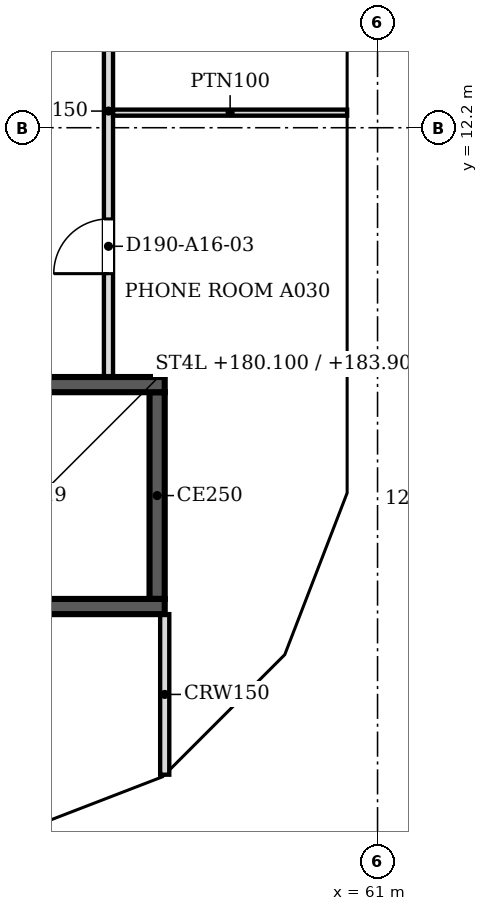
"""IFC4 building model, lengths in metres.
Left out: names, types, materials, properties, quantities, classifications, styles, units other than length and angle.
Written with IfcOpenShell. Run it as: python <this file> out.ifc"""

import sys

from ifc_helpers import new_model, si_unit, direction, frame, frame_2d, origin, place, context, subcontext, project, spatial, polyline, rectangle, outline, extrude, faceted_brep, source, transform, mapped, element, fill, save


model = new_model("IFC4")
c1 = context("Model", 3, precision=1e-05, world=origin(), true_north=direction((0.0, 1.0)))
c2 = subcontext(c1, "Body", "Model", "MODEL_VIEW")
j1 = project(units=[si_unit("LENGTHUNIT", "METRE"), si_unit("PLANEANGLEUNIT", "RADIAN")], contexts=[c1])
p1 = place(None, origin())
s1 = spatial("IfcSite", under=j1, at=p1, CompositionType="ELEMENT")
p2 = place(p1, origin())
s2 = spatial("IfcBuilding", under=s1, at=p2, CompositionType="ELEMENT")
p3 = place(p2, frame((0.0, 0.0, 178.2)))
s3 = spatial("IfcBuildingStorey", under=s2, at=p3, CompositionType="ELEMENT", Elevation=178.2)
m1 = source(origin(), c2, "Body", "Brep", [
    faceted_brep([(0.047, -0.25, 0.0), (2.997, -0.25, 3.8), (0.047, -0.25, 7.6), (0.0, -0.25, 7.541), (0.0, -0.25, 0.059), (0.093, 0.25, 7.54), (2.944, 0.25, 3.868), (2.944, 0.25, 3.732), (0.093, 0.25, 0.06), (2.997, 0.0, 3.8), (0.047, 0.0, 0.0), (0.047, 0.0, 7.6)], [[[0, 1, 2, 3, 4]], [[5, 6, 7, 8]], [[8, 7, 9, 1, 0, 10]], [[6, 5, 11, 2, 1, 9]], [[3, 2, 11]], [[10, 0, 4]], [[8, 10, 4, 3, 11, 5]], [[9, 7, 6]]]),
])
p4 = place(p3, frame((54.81, 0.233, -3.8), z_axis=(0.0, 0.0, 1.0), x_axis=(0.932990326376, 0.359901446078, 0.0)))
e1 = element("IfcWall", 1, at=p4, inside=s3, PredefinedType="SOLIDWALL", context=c2, shape_type="MappedRepresentation", body=[
    mapped(m1, transform((0.0, 0.0, 0.0), scale=1.0)),
])
m2 = source(origin(), c2, "Body", "SweptSolid", [
    extrude(outline(polyline([(0.247, 0.665), (2.681, 3.8), (0.247, 6.935), (0.247, 0.665)])), frame((0.0, 0.26, 0.0), z_axis=(0.0, -1.0, 0.0), x_axis=(1.0, 0.0, 0.0)), (0.0, 0.0, 1.0), 0.52),
])
p5 = place(p4, origin())
e2 = element("IfcOpeningElement", 2, at=p5, cuts=e1, PredefinedType="OPENING", context=c2, shape_type="MappedRepresentation", body=[
    mapped(m2, transform((0.0, 0.0, 0.0), scale=1.0)),
])
m3 = source(origin(), c2, "Body", "Brep", [
    faceted_brep([(2.944, -0.25, 0.0), (2.997, -0.25, 0.068), (2.997, -0.25, 7.532), (2.944, -0.25, 7.6), (0.0, -0.25, 3.8), (0.053, 0.25, 3.868), (2.891, 0.25, 7.532), (2.891, 0.25, 0.068), (0.053, 0.25, 3.732), (2.944, 0.0, 0.0), (2.944, 0.0, 7.6), (0.0, 0.0, 3.8)], [[[0, 1, 2, 3, 4]], [[5, 6, 7, 8]], [[1, 0, 9]], [[10, 3, 2]], [[6, 5, 11, 4, 3, 10]], [[8, 7, 9, 0, 4, 11]], [[8, 11, 5]], [[1, 9, 7, 6, 10, 2]]]),
])
p6 = place(p3, frame((57.606, 1.312, -3.8), z_axis=(0.0, 0.0, 1.0), x_axis=(0.707147509625, 0.707066050402, 0.0)))
e3 = element("IfcWall", 3, at=p6, inside=s3, PredefinedType="SOLIDWALL", context=c2, shape_type="MappedRepresentation", body=[
    mapped(m3, transform((0.0, 0.0, 0.0), scale=1.0)),
])
m4 = source(origin(), c2, "Body", "SweptSolid", [
    extrude(outline(polyline([(2.744, 6.934), (0.316, 3.8), (2.744, 0.667), (2.744, 6.934)])), frame((0.0, 0.26, 0.0), z_axis=(0.0, -1.0, 0.0), x_axis=(1.0, 0.0, 0.0)), (0.0, 0.0, 1.0), 0.52),
])
p7 = place(p6, origin())
e4 = element("IfcOpeningElement", 4, at=p7, cuts=e3, PredefinedType="OPENING", context=c2, shape_type="MappedRepresentation", body=[
    mapped(m4, transform((0.0, 0.0, 0.0), scale=1.0)),
])
m5 = source(origin(), c2, "Body", "Brep", [
    faceted_brep([(0.053, -0.25, 0.0), (3.003, -0.25, 3.8), (0.053, -0.25, 7.6), (0.0, -0.25, 7.532), (0.0, -0.25, 0.068), (0.106, 0.25, 7.532), (2.957, 0.25, 3.86), (2.957, 0.25, 3.74), (0.106, 0.25, 0.068), (3.003, 0.0, 3.8), (0.053, 0.0, 0.0), (0.053, 0.0, 7.6)], [[[0, 1, 2, 3, 4]], [[5, 6, 7, 8]], [[8, 7, 9, 1, 0, 10]], [[6, 5, 11, 2, 1, 9]], [[3, 2, 11]], [[10, 0, 4]], [[8, 10, 4, 3, 11, 5]], [[9, 7, 6]]]),
])
p8 = place(p3, frame((59.669, 3.344, -3.8), z_axis=(0.0, 0.0, 1.0), x_axis=(0.35992665181, 0.932980602862, 0.0)))
e5 = element("IfcWall", 5, at=p8, inside=s3, PredefinedType="SOLIDWALL", context=c2, shape_type="MappedRepresentation", body=[
    mapped(m5, transform((0.0, 0.0, 0.0), scale=1.0)),
])
m6 = source(origin(), c2, "Body", "SweptSolid", [
    extrude(outline(polyline([(0.253, 0.665), (2.687, 3.8), (0.253, 6.935), (0.253, 0.665)])), frame((0.0, 0.26, 0.0), z_axis=(0.0, -1.0, 0.0), x_axis=(1.0, 0.0, 0.0)), (0.0, 0.0, 1.0), 0.52),
])
p9 = place(p8, origin())
e6 = element("IfcOpeningElement", 6, at=p9, cuts=e5, PredefinedType="OPENING", context=c2, shape_type="MappedRepresentation", body=[
    mapped(m6, transform((0.0, 0.0, 0.0), scale=1.0)),
])
m7 = source(origin(), c2, "Body", "Brep", [
    faceted_brep([(3.003, -0.25, 0.0), (6.053, -0.25, 3.8), (3.003, -0.25, 7.6), (0.0, -0.25, 3.8), (0.047, 0.25, 3.859), (3.003, 0.25, 7.6), (6.053, 0.25, 3.8), (3.003, 0.25, 0.0), (0.047, 0.25, 3.741), (0.0, 0.0, 3.8)], [[[0, 1, 2, 3]], [[4, 5, 6, 7, 8]], [[7, 6, 1, 0]], [[6, 5, 2, 1]], [[5, 4, 9, 3, 2]], [[8, 7, 0, 3, 9]], [[8, 9, 4]]]),
])
p10 = place(p3, frame((60.75, 6.146, -3.8), z_axis=(0.0, 0.0, 1.0), x_axis=(0.0, 1.0, 0.0)))
e7 = element("IfcWall", 7, at=p10, inside=s3, PredefinedType="SOLIDWALL", context=c2, shape_type="MappedRepresentation", body=[
    mapped(m7, transform((0.0, 0.0, 0.0), scale=1.0)),
])
m8 = source(origin(), c2, "Body", "SweptSolid", [
    extrude(outline(polyline([(3.005, 0.401), (5.733, 3.8), (3.005, 7.199), (0.319, 3.8), (3.005, 0.401)])), frame((0.0, 0.26, 0.0), z_axis=(0.0, -1.0, 0.0), x_axis=(1.0, 0.0, 0.0)), (0.0, 0.0, 1.0), 0.52),
])
p11 = place(p10, origin())
e8 = element("IfcOpeningElement", 8, at=p11, cuts=e7, PredefinedType="OPENING", context=c2, shape_type="MappedRepresentation", body=[
    mapped(m8, transform((0.0, 0.0, 0.0), scale=1.0)),
])
m9 = source(origin(), c2, "Body", "SweptSolid", [
    extrude(outline(polyline([(3.05, 0.0), (6.1, 3.8), (3.05, 7.6), (0.0, 3.8), (3.05, 0.0)])), frame((0.0, 0.25, 0.0), z_axis=(0.0, -1.0, 0.0), x_axis=(1.0, 0.0, 0.0)), (0.0, 0.0, 1.0), 0.5),
])
p12 = place(p3, frame((60.75, 12.2, -3.8), z_axis=(0.0, 0.0, 1.0), x_axis=(0.0, 1.0, 0.0)))
e9 = element("IfcWall", 9, at=p12, inside=s3, PredefinedType="SOLIDWALL", context=c2, shape_type="MappedRepresentation", body=[
    mapped(m9, transform((0.0, 0.0, 0.0), scale=1.0)),
])
m10 = source(origin(), c2, "Body", "SweptSolid", [
    extrude(outline(polyline([(3.05, 0.399), (5.78, 3.8), (3.05, 7.201), (0.321, 3.8), (3.05, 0.399)])), frame((0.0, 0.26, 0.0), z_axis=(0.0, -1.0, 0.0), x_axis=(1.0, 0.0, 0.0)), (0.0, 0.0, 1.0), 0.52),
])
p13 = place(p12, origin())
e10 = element("IfcOpeningElement", 10, at=p13, cuts=e9, PredefinedType="OPENING", context=c2, shape_type="MappedRepresentation", body=[
    mapped(m10, transform((0.0, 0.0, 0.0), scale=1.0)),
])
p14 = place(p2, frame((0.0, 0.0, 182.0)))
s4 = spatial("IfcBuildingStorey", under=s2, at=p14, CompositionType="ELEMENT", Elevation=182.0)
m11 = source(origin(), c2, "Body", "Brep", [
    faceted_brep([(2.95, -0.25, 0.0), (3.003, -0.25, 0.068), (3.003, -0.25, 7.532), (2.95, -0.25, 7.6), (0.0, -0.25, 3.8), (0.047, 0.25, 3.86), (2.898, 0.25, 7.532), (2.898, 0.25, 0.068), (0.047, 0.25, 3.74), (2.95, 0.0, 0.0), (2.95, 0.0, 7.6), (0.0, 0.0, 3.8)], [[[0, 1, 2, 3, 4]], [[5, 6, 7, 8]], [[1, 0, 9]], [[10, 3, 2]], [[6, 5, 11, 4, 3, 10]], [[8, 7, 9, 0, 4, 11]], [[8, 11, 5]], [[1, 9, 7, 6, 10, 2]]]),
])
p15 = place(p14, frame((54.854, 0.25, -3.8), z_axis=(0.0, 0.0, 1.0), x_axis=(0.932970071518, 0.359953949349, 0.0)))
e11 = element("IfcWall", 11, at=p15, inside=s4, PredefinedType="SOLIDWALL", context=c2, shape_type="MappedRepresentation", body=[
    mapped(m11, transform((0.0, 0.0, 0.0), scale=1.0)),
])
m12 = source(origin(), c2, "Body", "SweptSolid", [
    extrude(outline(polyline([(2.75, 6.935), (0.316, 3.8), (2.75, 0.665), (2.75, 6.935)])), frame((0.0, 0.26, 0.0), z_axis=(0.0, -1.0, 0.0), x_axis=(1.0, 0.0, 0.0)), (0.0, 0.0, 1.0), 0.52),
])
p16 = place(p15, origin())
e12 = element("IfcOpeningElement", 12, at=p16, cuts=e11, PredefinedType="OPENING", context=c2, shape_type="MappedRepresentation", body=[
    mapped(m12, transform((0.0, 0.0, 0.0), scale=1.0)),
])
m13 = source(origin(), c2, "Body", "Brep", [
    faceted_brep([(0.053, -0.25, 0.0), (2.997, -0.25, 3.8), (0.053, -0.25, 7.6), (0.0, -0.25, 7.532), (0.0, -0.25, 0.068), (0.106, 0.25, 7.532), (2.944, 0.25, 3.868), (2.944, 0.25, 3.732), (0.106, 0.25, 0.068), (2.997, 0.0, 3.8), (0.053, 0.0, 0.0), (0.053, 0.0, 7.6)], [[[0, 1, 2, 3, 4]], [[5, 6, 7, 8]], [[8, 7, 9, 1, 0, 10]], [[6, 5, 11, 2, 1, 9]], [[3, 2, 11]], [[10, 0, 4]], [[8, 10, 4, 3, 11, 5]], [[9, 7, 6]]]),
])
p17 = place(p14, frame((57.569, 1.274, -3.8), z_axis=(0.0, 0.0, 1.0), x_axis=(0.707066050402, 0.707147509625, 0.0)))
e13 = element("IfcWall", 13, at=p17, inside=s4, PredefinedType="SOLIDWALL", context=c2, shape_type="MappedRepresentation", body=[
    mapped(m13, transform((0.0, 0.0, 0.0), scale=1.0)),
])
m14 = source(origin(), c2, "Body", "SweptSolid", [
    extrude(outline(polyline([(0.253, 0.666), (2.681, 3.8), (0.253, 6.934), (0.253, 0.666)])), frame((0.0, 0.26, 0.0), z_axis=(0.0, -1.0, 0.0), x_axis=(1.0, 0.0, 0.0)), (0.0, 0.0, 1.0), 0.52),
])
p18 = place(p17, origin())
e14 = element("IfcOpeningElement", 14, at=p18, cuts=e13, PredefinedType="OPENING", context=c2, shape_type="MappedRepresentation", body=[
    mapped(m14, transform((0.0, 0.0, 0.0), scale=1.0)),
])
m15 = source(origin(), c2, "Body", "Brep", [
    faceted_brep([(2.95, -0.25, 0.0), (2.997, -0.25, 0.059), (2.997, -0.25, 7.541), (2.95, -0.25, 7.6), (0.0, -0.25, 3.8), (0.053, 0.25, 3.868), (2.904, 0.25, 7.54), (2.904, 0.25, 0.06), (0.053, 0.25, 3.732), (2.95, 0.0, 0.0), (2.95, 0.0, 7.6), (0.0, 0.0, 3.8)], [[[0, 1, 2, 3, 4]], [[5, 6, 7, 8]], [[1, 0, 9]], [[10, 3, 2]], [[6, 5, 11, 4, 3, 10]], [[8, 7, 9, 0, 4, 11]], [[8, 11, 5]], [[1, 9, 7, 6, 10, 2]]]),
])
p19 = place(p14, frame((59.688, 3.394, -3.8), z_axis=(0.0, 0.0, 1.0), x_axis=(0.359972353723, 0.932962970624, 0.0)))
e15 = element("IfcWall", 15, at=p19, inside=s4, PredefinedType="SOLIDWALL", context=c2, shape_type="MappedRepresentation", body=[
    mapped(m15, transform((0.0, 0.0, 0.0), scale=1.0)),
])
p20 = place(p19, origin())
e16 = element("IfcOpeningElement", 16, at=p20, cuts=e15, PredefinedType="OPENING", context=c2, shape_type="MappedRepresentation", body=[
    mapped(m12, transform((0.0, 0.0, 0.0), scale=1.0)),
])
m16 = source(origin(), c2, "Body", "Brep", [
    faceted_brep([(0.047, -0.25, 0.0), (3.05, -0.25, 3.8), (0.047, -0.25, 7.6), (0.0, -0.25, 7.54), (0.0, -0.25, 0.06), (0.093, 0.25, 7.541), (3.05, 0.25, 3.8), (0.093, 0.25, 0.059), (0.047, 0.0, 0.0), (0.047, 0.0, 7.6)], [[[0, 1, 2, 3, 4]], [[5, 6, 7]], [[7, 6, 1, 0, 8]], [[6, 5, 9, 2, 1]], [[3, 2, 9]], [[8, 0, 4]], [[7, 8, 4, 3, 9, 5]]]),
])
p21 = place(p14, frame((60.75, 6.1, -3.8), z_axis=(0.0, 0.0, 1.0), x_axis=(0.0, 1.0, 0.0)))
e17 = element("IfcWall", 17, at=p21, inside=s4, PredefinedType="SOLIDWALL", context=c2, shape_type="MappedRepresentation", body=[
    mapped(m16, transform((0.0, 0.0, 0.0), scale=1.0)),
])
m17 = source(origin(), c2, "Body", "SweptSolid", [
    extrude(outline(polyline([(0.247, 0.656), (2.731, 3.8), (0.247, 6.944), (0.247, 0.656)])), frame((0.0, 0.26, 0.0), z_axis=(0.0, -1.0, 0.0), x_axis=(1.0, 0.0, 0.0)), (0.0, 0.0, 1.0), 0.52),
])
p22 = place(p21, origin())
e18 = element("IfcOpeningElement", 18, at=p22, cuts=e17, PredefinedType="OPENING", context=c2, shape_type="MappedRepresentation", body=[
    mapped(m17, transform((0.0, 0.0, 0.0), scale=1.0)),
])
p23 = place(p14, frame((60.75, 9.15, -3.8), z_axis=(0.0, 0.0, 1.0), x_axis=(0.0, 1.0, 0.0)))
e19 = element("IfcWall", 19, at=p23, inside=s4, PredefinedType="SOLIDWALL", context=c2, shape_type="MappedRepresentation", body=[
    mapped(m9, transform((0.0, 0.0, 0.0), scale=1.0)),
])
p24 = place(p23, origin())
e20 = element("IfcOpeningElement", 20, at=p24, cuts=e19, PredefinedType="OPENING", context=c2, shape_type="MappedRepresentation", body=[
    mapped(m10, transform((0.0, 0.0, 0.0), scale=1.0)),
])
p25 = place(p3, frame((57.5, 4.325, 0.0), z_axis=(0.0, 0.0, 1.0), x_axis=(-1.0, 0.0, 0.0)))
e21 = element("IfcWall", 21, at=p25, inside=s3, PredefinedType="SOLIDWALL", context=c2, shape_type="SweptSolid", body=[
    extrude(rectangle(XDim=8.5, YDim=0.25, at=frame_2d((4.25, 0.0))), origin(), (0.0, 0.0, 1.0), 3.8),
])
m18 = source(origin(), c2, "Body", "SweptSolid", [
    extrude(rectangle(XDim=1.2, YDim=2.1, at=frame_2d((0.6, 1.05))), frame((0.0, 0.135, 0.0), z_axis=(0.0, -1.0, 0.0), x_axis=(1.0, 0.0, 0.0)), (0.0, 0.0, 1.0), 0.27),
])
p26 = place(p25, frame((6.9, 0.0, 0.0)))
e22 = element("IfcOpeningElement", 22, at=p26, cuts=e21, PredefinedType="OPENING", context=c2, shape_type="MappedRepresentation", body=[
    mapped(m18, transform((0.0, 0.0, 0.0), scale=1.0)),
])
p27 = place(p3, frame((49.0, 7.975, 0.0), z_axis=(0.0, 0.0, 1.0), x_axis=(1.0, 0.0, 0.0)))
e23 = element("IfcWall", 23, at=p27, inside=s3, PredefinedType="SOLIDWALL", context=c2, shape_type="SweptSolid", body=[
    extrude(rectangle(XDim=8.5, YDim=0.25, at=frame_2d((4.25, 0.0))), origin(), (0.0, 0.0, 1.0), 3.8),
])
p28 = place(p3, frame((57.375, 7.85, 0.0), z_axis=(0.0, 0.0, 1.0), x_axis=(0.0, -1.0, 0.0)))
e24 = element("IfcWall", 24, at=p28, inside=s3, PredefinedType="SOLIDWALL", context=c2, shape_type="SweptSolid", body=[
    extrude(rectangle(XDim=3.4, YDim=0.25, at=frame_2d((1.7, 0.0))), origin(), (0.0, 0.0, 1.0), 3.8),
])
p29 = place(p3, frame((57.5, 1.559, 0.0), z_axis=(0.0, 0.0, 1.0), x_axis=(0.0, 1.0, 0.0)))
e25 = element("IfcWall", 25, at=p29, inside=s3, PredefinedType="PARTITIONING", context=c2, shape_type="SweptSolid", body=[
    extrude(rectangle(XDim=2.641, YDim=0.15, at=frame_2d((1.32, 0.0))), origin(), (0.0, 0.0, 1.0), 3.067),
])
p30 = place(p3, frame((56.575, 17.024, 0.0), z_axis=(0.0, 0.0, 1.0), x_axis=(0.0, -1.0, 0.0)))
e26 = element("IfcWall", 26, at=p30, inside=s3, PredefinedType="PARTITIONING", context=c2, shape_type="SweptSolid", body=[
    extrude(rectangle(XDim=8.924, YDim=0.15, at=frame_2d((4.462, 0.0))), origin(), (0.0, 0.0, 1.0), 3.067),
])
m19 = source(origin(), c2, "Body", "SweptSolid", [
    extrude(rectangle(XDim=0.9, YDim=2.1, at=frame_2d((0.45, 1.05))), frame((0.0, 0.085, 0.0), z_axis=(0.0, -1.0, 0.0), x_axis=(1.0, 0.0, 0.0)), (0.0, 0.0, 1.0), 0.17),
])
p31 = place(p30, frame((6.324, 0.0, 0.0)))
e27 = element("IfcOpeningElement", 27, at=p31, cuts=e26, PredefinedType="OPENING", context=c2, shape_type="MappedRepresentation", body=[
    mapped(m19, transform((0.0, 0.0, 0.0), scale=1.0)),
])
p32 = place(p30, frame((1.876, 0.0, 0.0)))
e28 = element("IfcOpeningElement", 28, at=p32, cuts=e26, PredefinedType="OPENING", context=c2, shape_type="MappedRepresentation", body=[
    mapped(m19, transform((0.0, 0.0, 0.0), scale=1.0)),
])
p33 = place(p3, frame((56.651, 12.448, 0.0), z_axis=(0.0, 0.0, 1.0), x_axis=(1.0, 0.0, 0.0)))
e29 = element("IfcWall", 29, at=p33, inside=s3, PredefinedType="PARTITIONING", context=c2, shape_type="SweptSolid", body=[
    extrude(rectangle(XDim=3.849, YDim=0.1, at=frame_2d((1.925, 0.0))), origin(), (0.0, 0.0, 1.0), 3.067),
])
m20 = source(origin(), c2, "Body", "SweptSolid", [
    extrude(rectangle(XDim=0.9, YDim=2.1, at=frame_2d((0.45, 1.05))), frame((0.0, 0.025, 0.0), z_axis=(0.0, -1.0, 0.0), x_axis=(1.0, 0.0, 0.0)), (0.0, 0.0, 1.0), 0.05),
])
p34 = place(p31, origin())
e30 = element("IfcDoor", 30, at=p34, inside=s3, OperationType="SINGLE_SWING_RIGHT", PredefinedType="DOOR", context=c2, shape_type="MappedRepresentation", body=[
    mapped(m20, transform((0.0, 0.0, 0.0), scale=1.0)),
])
fill(e27, e30)
save(model, sys.argv[1])
